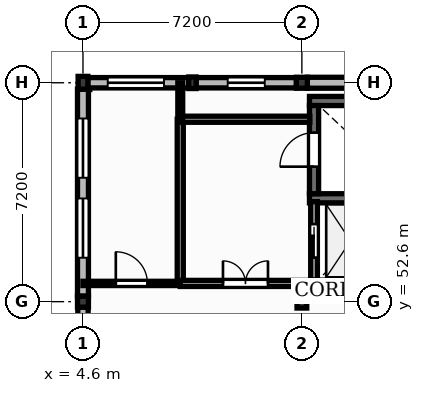
"""IFC4 building model, lengths in metres.
Left out: names, types, materials, properties, quantities, classifications, styles, units other than length and angle.
Written with IfcOpenShell. Run it as: python <this file> out.ifc"""

import sys

from ifc_helpers import new_model, si_unit, direction, frame, frame_2d, origin, origin_2d, place, context, subcontext, project, spatial, rectangle, extrude, element, fill, save


model = new_model("IFC4")
c1 = context("Model", 3, precision=1e-05, world=origin(), true_north=direction((0.0, 1.0)))
c2 = subcontext(c1, "Body", "Model", "MODEL_VIEW")
j1 = project(units=[si_unit("LENGTHUNIT", "METRE"), si_unit("PLANEANGLEUNIT", "RADIAN")], contexts=[c1])
p1 = place(None, origin())
s1 = spatial("IfcSite", under=j1, at=p1, CompositionType="ELEMENT")
p2 = place(p1, origin())
s2 = spatial("IfcBuilding", under=s1, at=p2, CompositionType="ELEMENT")
p3 = place(p2, frame((0.0, 0.0, 4.5)))
s3 = spatial("IfcBuildingStorey", under=s2, at=p3, CompositionType="ELEMENT", Elevation=4.5)
p4 = place(p3, frame((4.6, 52.6, 0.0), z_axis=(0.0, 0.0, 1.0), x_axis=(1.0, 0.0, 0.0)))
e1 = element("IfcColumn", 1, at=p4, inside=s3, PredefinedType="COLUMN", context=c2, shape_type="SweptSolid", body=[
    extrude(rectangle(XDim=0.36, YDim=0.36, at=origin_2d()), origin(), (0.0, 0.0, 1.0), 4.26),
])
for number, where, z_axis, x_axis in (
    (2, (4.6, 59.8, 0.0), (0.0, 0.0, 1.0), (1.0, 0.0, 0.0)),
    (3, (11.8, 52.6, 0.0), (0.0, 0.0, 1.0), (1.0, 0.0, 0.0)),
):
    element("IfcColumn", number, at=place(p3, frame(where, z_axis=z_axis, x_axis=x_axis)), inside=s3, PredefinedType="COLUMN", context=c2, shape_type="SweptSolid", body=[
        extrude(rectangle(XDim=0.32, YDim=0.42, at=origin_2d()), origin(), (0.0, 0.0, 1.0), 4.26),
    ])
p5 = place(p3, frame((11.8, 59.8, 0.0), z_axis=(0.0, 0.0, 1.0), x_axis=(1.0, 0.0, 0.0)))
e4 = element("IfcColumn", 4, at=p5, inside=s3, PredefinedType="COLUMN", context=c2, shape_type="SweptSolid", body=[
    extrude(rectangle(XDim=0.36, YDim=0.36, at=origin_2d()), origin(), (0.0, 0.0, 1.0), 4.26),
])
p6 = place(p3, frame((8.2, 59.8, 0.0), z_axis=(0.0, 0.0, 1.0), x_axis=(1.0, 0.0, 0.0)))
e5 = element("IfcColumn", 5, at=p6, inside=s3, PredefinedType="PILASTER", context=c2, shape_type="SweptSolid", body=[
    extrude(rectangle(XDim=0.24, YDim=0.38, at=origin_2d()), origin(), (0.0, 0.0, 1.0), 4.26),
])
p7 = place(p3, frame((4.6, 45.61, 0.0), z_axis=(0.0, 0.0, 1.0), x_axis=(0.0, 1.0, 0.0)))
e6 = element("IfcWall", 6, at=p7, inside=s3, PredefinedType="SOLIDWALL", context=c2, shape_type="SweptSolid", body=[
    extrude(rectangle(XDim=6.81, YDim=0.34, at=frame_2d((3.405, 0.0))), origin(), (0.0, 0.0, 1.0), 3.8),
])
p8 = place(p7, frame((1.78, 0.0, 0.9)))
e7 = element("IfcOpeningElement", 7, at=p8, cuts=e6, PredefinedType="OPENING", context=c2, shape_type="SweptSolid", body=[
    extrude(rectangle(XDim=1.55, YDim=2.4, at=frame_2d((0.775, 1.2))), frame((0.0, 0.18, 0.0), z_axis=(0.0, -1.0, 0.0), x_axis=(1.0, 0.0, 0.0)), (0.0, 0.0, 1.0), 0.36),
])
p9 = place(p3, frame((4.76, 59.8, 0.0), z_axis=(0.0, 0.0, 1.0), x_axis=(1.0, 0.0, 0.0)))
e8 = element("IfcWall", 8, at=p9, inside=s3, PredefinedType="SOLIDWALL", context=c2, shape_type="SweptSolid", body=[
    extrude(rectangle(XDim=3.32, YDim=0.34, at=frame_2d((1.66, 0.0))), origin(), (0.0, 0.0, 1.0), 3.8),
])
p10 = place(p9, frame((0.655, 0.0, 1.0)))
e9 = element("IfcOpeningElement", 9, at=p10, cuts=e8, PredefinedType="OPENING", context=c2, shape_type="SweptSolid", body=[
    extrude(rectangle(XDim=1.85, YDim=2.2, at=frame_2d((0.925, 1.1))), frame((0.0, 0.18, 0.0), z_axis=(0.0, -1.0, 0.0), x_axis=(1.0, 0.0, 0.0)), (0.0, 0.0, 1.0), 0.36),
])
p11 = place(p3, frame((8.32, 59.8, 0.0), z_axis=(0.0, 0.0, 1.0), x_axis=(1.0, 0.0, 0.0)))
e10 = element("IfcWall", 10, at=p11, inside=s3, PredefinedType="SOLIDWALL", context=c2, shape_type="SweptSolid", body=[
    extrude(rectangle(XDim=3.3, YDim=0.34, at=frame_2d((1.65, 0.0))), origin(), (0.0, 0.0, 1.0), 3.8),
])
p12 = place(p11, frame((1.04, 0.0, 1.0)))
e11 = element("IfcOpeningElement", 11, at=p12, cuts=e10, PredefinedType="OPENING", context=c2, shape_type="SweptSolid", body=[
    extrude(rectangle(XDim=1.22, YDim=2.2, at=frame_2d((0.61, 1.1))), frame((0.0, 0.18, 0.0), z_axis=(0.0, -1.0, 0.0), x_axis=(1.0, 0.0, 0.0)), (0.0, 0.0, 1.0), 0.36),
])
p13 = place(p3, frame((4.6, 52.78, 0.0), z_axis=(0.0, 0.0, 1.0), x_axis=(0.0, 1.0, 0.0)))
e12 = element("IfcWall", 12, at=p13, inside=s3, PredefinedType="SOLIDWALL", context=c2, shape_type="SweptSolid", body=[
    extrude(rectangle(XDim=6.81, YDim=0.36, at=frame_2d((3.405, 0.0))), origin(), (0.0, 0.0, 1.0), 3.8),
])
p14 = place(p13, frame((1.265, 0.0, 0.9)))
e13 = element("IfcOpeningElement", 13, at=p14, cuts=e12, PredefinedType="OPENING", context=c2, shape_type="SweptSolid", body=[
    extrude(rectangle(XDim=1.95, YDim=2.4, at=frame_2d((0.975, 1.2))), frame((0.0, 0.19, 0.0), z_axis=(0.0, -1.0, 0.0), x_axis=(1.0, 0.0, 0.0)), (0.0, 0.0, 1.0), 0.38),
])
p15 = place(p13, frame((3.895, 0.0, 0.9)))
e14 = element("IfcOpeningElement", 14, at=p15, cuts=e12, PredefinedType="OPENING", context=c2, shape_type="SweptSolid", body=[
    extrude(rectangle(XDim=1.95, YDim=2.4, at=frame_2d((0.975, 1.2))), frame((0.0, 0.19, 0.0), z_axis=(0.0, -1.0, 0.0), x_axis=(1.0, 0.0, 0.0)), (0.0, 0.0, 1.0), 0.38),
])
p16 = place(p3, frame((11.98, 59.8, 0.0), z_axis=(0.0, 0.0, 1.0), x_axis=(1.0, 0.0, 0.0)))
e15 = element("IfcWall", 15, at=p16, inside=s3, PredefinedType="SOLIDWALL", context=c2, shape_type="SweptSolid", body=[
    extrude(rectangle(XDim=6.86, YDim=0.36, at=frame_2d((3.43, 0.0))), origin(), (0.0, 0.0, 1.0), 3.8),
])
for number, where, z_axis, x_axis in (
    (16, (12.05, 56.0, 0.0), (0.0, 0.0, 1.0), (1.0, 0.0, 0.0)),
    (17, (12.05, 59.2, 0.0), (0.0, 0.0, 1.0), (1.0, 0.0, 0.0)),
):
    element("IfcWall", number, at=place(p3, frame(where, z_axis=z_axis, x_axis=x_axis)), inside=s3, PredefinedType="SHEAR", context=c2, shape_type="SweptSolid", body=[
        extrude(rectangle(XDim=6.7, YDim=0.3, at=frame_2d((3.35, 0.0))), origin(), (0.0, 0.0, 1.0), 4.25),
    ])
p17 = place(p3, frame((12.2, 56.15, 0.0), z_axis=(0.0, 0.0, 1.0), x_axis=(0.0, 1.0, 0.0)))
e18 = element("IfcWall", 18, at=p17, inside=s3, PredefinedType="SHEAR", context=c2, shape_type="SweptSolid", body=[
    extrude(rectangle(XDim=2.9, YDim=0.3, at=frame_2d((1.45, 0.0))), origin(), (0.0, 0.0, 1.0), 4.25),
])
p18 = place(p17, frame((0.89, 0.0, 0.0)))
e19 = element("IfcOpeningElement", 19, at=p18, cuts=e18, PredefinedType="OPENING", context=c2, shape_type="SweptSolid", body=[
    extrude(rectangle(XDim=1.12, YDim=2.1, at=frame_2d((0.56, 1.05))), frame((0.0, 0.16, 0.0), z_axis=(0.0, -1.0, 0.0), x_axis=(1.0, 0.0, 0.0)), (0.0, 0.0, 1.0), 0.32),
])
p19 = place(p3, frame((12.2, 53.2, 0.0), z_axis=(0.0, 0.0, 1.0), x_axis=(1.0, 0.0, 0.0)))
e20 = element("IfcWall", 20, at=p19, inside=s3, PredefinedType="SOLIDWALL", context=c2, shape_type="SweptSolid", body=[
    extrude(rectangle(XDim=2.4, YDim=0.22, at=frame_2d((1.2, 0.0))), origin(), (0.0, 0.0, 1.0), 4.25),
])
p20 = place(p3, frame((12.2, 53.31, 0.0), z_axis=(0.0, 0.0, 1.0), x_axis=(0.0, 1.0, 0.0)))
e21 = element("IfcWall", 21, at=p20, inside=s3, PredefinedType="SOLIDWALL", context=c2, shape_type="SweptSolid", body=[
    extrude(rectangle(XDim=2.58, YDim=0.22, at=frame_2d((1.29, 0.0))), origin(), (0.0, 0.0, 1.0), 4.25),
])
p21 = place(p20, frame((0.74, 0.0, 0.0)))
e22 = element("IfcOpeningElement", 22, at=p21, cuts=e21, PredefinedType="OPENING", context=c2, shape_type="SweptSolid", body=[
    extrude(rectangle(XDim=1.1, YDim=2.15, at=frame_2d((0.55, 1.075))), frame((0.0, 0.12, 0.0), z_axis=(0.0, -1.0, 0.0), x_axis=(1.0, 0.0, 0.0)), (0.0, 0.0, 1.0), 0.24),
])
p22 = place(p3, frame((4.6, 53.2, 0.0), z_axis=(0.0, 0.0, 1.0), x_axis=(1.0, 0.0, 0.0)))
e23 = element("IfcWall", 23, at=p22, inside=s3, PredefinedType="PARTITIONING", context=c2, shape_type="SweptSolid", body=[
    extrude(rectangle(XDim=3.2, YDim=0.14, at=frame_2d((1.6, 0.0))), origin(), (0.0, 0.0, 1.0), 4.18),
])
p23 = place(p22, frame((1.08, 0.0, 0.0)))
e24 = element("IfcOpeningElement", 24, at=p23, cuts=e23, PredefinedType="OPENING", context=c2, shape_type="SweptSolid", body=[
    extrude(rectangle(XDim=1.04, YDim=2.1, at=frame_2d((0.52, 1.05))), frame((0.0, 0.08, 0.0), z_axis=(0.0, -1.0, 0.0), x_axis=(1.0, 0.0, 0.0)), (0.0, 0.0, 1.0), 0.16),
])
p24 = place(p3, frame((7.8, 53.27, 0.0), z_axis=(0.0, 0.0, 1.0), x_axis=(0.0, 1.0, 0.0)))
e25 = element("IfcWall", 25, at=p24, inside=s3, PredefinedType="PARTITIONING", context=c2, shape_type="SweptSolid", body=[
    extrude(rectangle(XDim=5.33, YDim=0.2, at=frame_2d((2.665, 0.0))), origin(), (0.0, 0.0, 1.0), 4.18),
])
p25 = place(p3, frame((7.8, 53.2, 0.0), z_axis=(0.0, 0.0, 1.0), x_axis=(1.0, 0.0, 0.0)))
e26 = element("IfcWall", 26, at=p25, inside=s3, PredefinedType="PARTITIONING", context=c2, shape_type="SweptSolid", body=[
    extrude(rectangle(XDim=4.29, YDim=0.2, at=frame_2d((2.145, 0.0))), origin(), (0.0, 0.0, 1.0), 4.18),
])
p26 = place(p25, frame((1.405, 0.0, 0.0)))
e27 = element("IfcOpeningElement", 27, at=p26, cuts=e26, PredefinedType="OPENING", context=c2, shape_type="SweptSolid", body=[
    extrude(rectangle(XDim=1.48, YDim=2.25, at=frame_2d((0.74, 1.125))), frame((0.0, 0.11, 0.0), z_axis=(0.0, -1.0, 0.0), x_axis=(1.0, 0.0, 0.0)), (0.0, 0.0, 1.0), 0.22),
])
p27 = place(p3, frame((12.06, 58.6, 0.0), z_axis=(0.0, 0.0, 1.0), x_axis=(-1.0, 0.0, 0.0)))
e28 = element("IfcWall", 28, at=p27, inside=s3, PredefinedType="PARTITIONING", context=c2, shape_type="SweptSolid", body=[
    extrude(rectangle(XDim=4.26, YDim=0.2, at=frame_2d((2.13, 0.0))), origin(), (0.0, 0.0, 1.0), 4.18),
])
p28 = place(p3, frame((7.8, 58.6, 0.0), z_axis=(0.0, 0.0, 1.0), x_axis=(0.0, 1.0, 0.0)))
e29 = element("IfcWall", 29, at=p28, inside=s3, PredefinedType="PARTITIONING", context=c2, shape_type="SweptSolid", body=[
    extrude(rectangle(XDim=1.2, YDim=0.16, at=frame_2d((0.6, 0.0))), origin(), (0.0, 0.0, 1.0), 4.18),
])
p29 = place(p10, origin())
e30 = element("IfcWindow", 30, at=p29, inside=s3, PartitioningType="DOUBLE_PANEL_VERTICAL", PredefinedType="WINDOW", context=c2, shape_type="SweptSolid", body=[
    extrude(rectangle(XDim=1.85, YDim=2.2, at=frame_2d((0.925, 1.1))), frame((0.0, 0.03, 0.0), z_axis=(0.0, -1.0, 0.0), x_axis=(1.0, 0.0, 0.0)), (0.0, 0.0, 1.0), 0.06),
])
fill(e9, e30)
p30 = place(p12, origin())
e31 = element("IfcWindow", 31, at=p30, inside=s3, PartitioningType="SINGLE_PANEL", PredefinedType="WINDOW", context=c2, shape_type="SweptSolid", body=[
    extrude(rectangle(XDim=1.22, YDim=2.2, at=frame_2d((0.61, 1.1))), frame((0.0, 0.03, 0.0), z_axis=(0.0, -1.0, 0.0), x_axis=(1.0, 0.0, 0.0)), (0.0, 0.0, 1.0), 0.06),
])
fill(e11, e31)
p31 = place(p14, origin())
e32 = element("IfcWindow", 32, at=p31, inside=s3, PartitioningType="DOUBLE_PANEL_VERTICAL", PredefinedType="WINDOW", context=c2, shape_type="SweptSolid", body=[
    extrude(rectangle(XDim=1.95, YDim=2.4, at=frame_2d((0.975, 1.2))), frame((0.0, 0.03, 0.0), z_axis=(0.0, -1.0, 0.0), x_axis=(1.0, 0.0, 0.0)), (0.0, 0.0, 1.0), 0.06),
])
fill(e13, e32)
p32 = place(p15, origin())
e33 = element("IfcWindow", 33, at=p32, inside=s3, PartitioningType="DOUBLE_PANEL_VERTICAL", PredefinedType="WINDOW", context=c2, shape_type="SweptSolid", body=[
    extrude(rectangle(XDim=1.95, YDim=2.4, at=frame_2d((0.975, 1.2))), frame((0.0, 0.03, 0.0), z_axis=(0.0, -1.0, 0.0), x_axis=(1.0, 0.0, 0.0)), (0.0, 0.0, 1.0), 0.06),
])
fill(e14, e33)
p33 = place(p21, origin())
e34 = element("IfcDoor", 34, at=p33, inside=s3, OperationType="SLIDING_TO_LEFT", PredefinedType="DOOR", context=c2, shape_type="SweptSolid", body=[
    extrude(rectangle(XDim=1.1, YDim=2.15, at=frame_2d((0.55, 1.075))), frame((0.0, 0.025, 0.0), z_axis=(0.0, -1.0, 0.0), x_axis=(1.0, 0.0, 0.0)), (0.0, 0.0, 1.0), 0.05),
])
fill(e22, e34)
p34 = place(p18, origin())
e35 = element("IfcDoor", 35, at=p34, inside=s3, OperationType="SINGLE_SWING_LEFT", PredefinedType="DOOR", context=c2, shape_type="SweptSolid", body=[
    extrude(rectangle(XDim=1.12, YDim=2.1, at=frame_2d((0.56, 1.05))), frame((0.0, 0.025, 0.0), z_axis=(0.0, -1.0, 0.0), x_axis=(1.0, 0.0, 0.0)), (0.0, 0.0, 1.0), 0.05),
])
fill(e19, e35)
p35 = place(p26, origin())
e36 = element("IfcDoor", 36, at=p35, inside=s3, OperationType="DOUBLE_DOOR_SINGLE_SWING", PredefinedType="DOOR", context=c2, shape_type="SweptSolid", body=[
    extrude(rectangle(XDim=1.48, YDim=2.25, at=frame_2d((0.74, 1.125))), frame((0.0, 0.025, 0.0), z_axis=(0.0, -1.0, 0.0), x_axis=(1.0, 0.0, 0.0)), (0.0, 0.0, 1.0), 0.05),
])
fill(e27, e36)
p36 = place(p23, origin())
e37 = element("IfcDoor", 37, at=p36, inside=s3, OperationType="SINGLE_SWING_LEFT", PredefinedType="DOOR", context=c2, shape_type="SweptSolid", body=[
    extrude(rectangle(XDim=1.04, YDim=2.1, at=frame_2d((0.52, 1.05))), frame((0.0, 0.025, 0.0), z_axis=(0.0, -1.0, 0.0), x_axis=(1.0, 0.0, 0.0)), (0.0, 0.0, 1.0), 0.05),
])
fill(e24, e37)
save(model, sys.argv[1])
